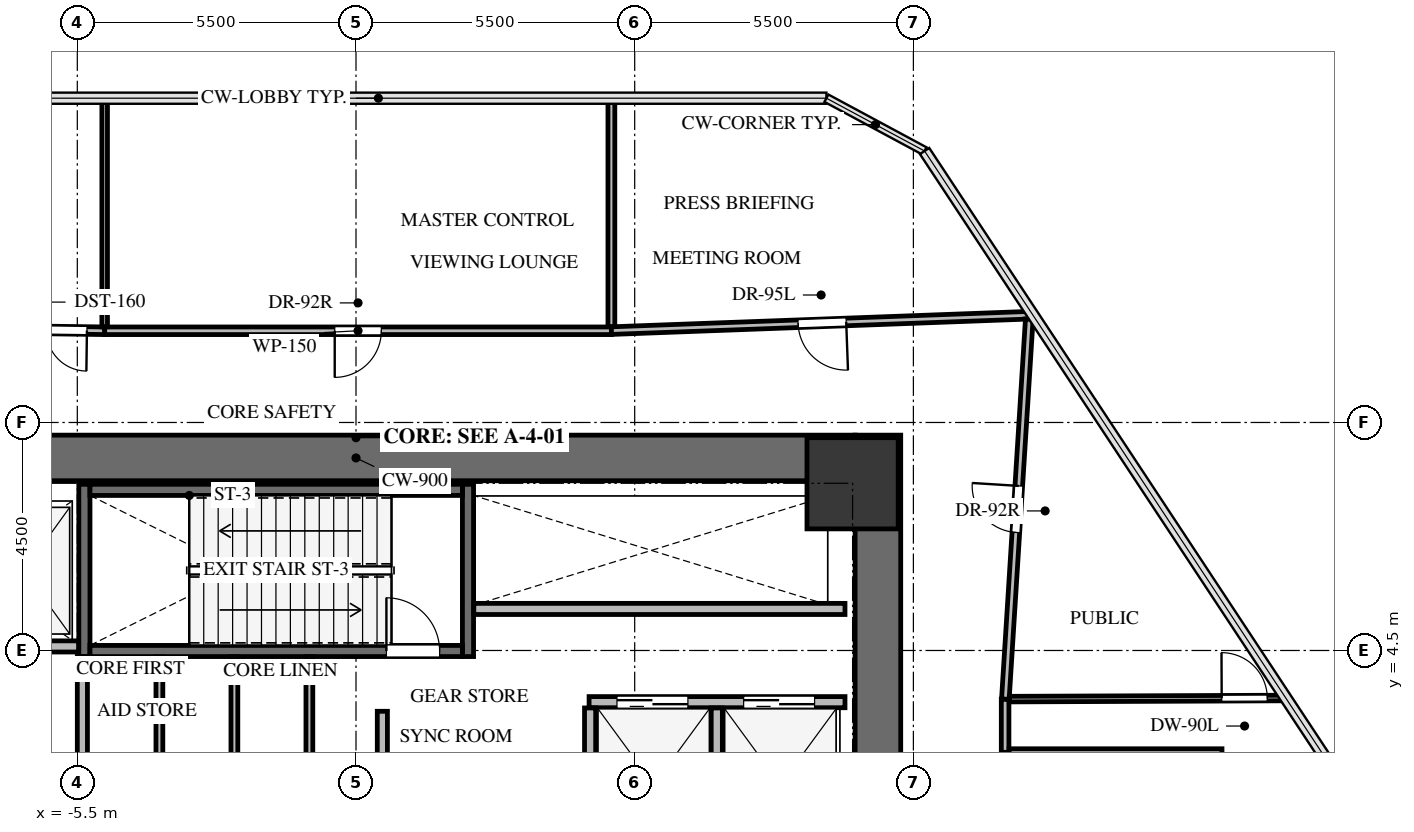
"""IFC4 building model, lengths in metres.
Left out: names, types, materials, properties, quantities, classifications, styles, units other than length and angle.
Written with IfcOpenShell. Run it as: python <this file> out.ifc"""

import sys

from ifc_helpers import new_model, si_unit, direction, frame, frame_2d, origin, origin_2d, place, context, subcontext, project, spatial, rectangle, extrude, source, transform, mapped, element, fill, save


model = new_model("IFC4")
c1 = context("Model", 3, precision=1e-05, world=origin(), true_north=direction((0.0, 1.0)))
c2 = subcontext(c1, "Body", "Model", "MODEL_VIEW")
j1 = project(units=[si_unit("LENGTHUNIT", "METRE"), si_unit("PLANEANGLEUNIT", "RADIAN")], contexts=[c1])
p1 = place(None, origin())
s1 = spatial("IfcSite", under=j1, at=p1, CompositionType="ELEMENT")
p2 = place(p1, origin())
s2 = spatial("IfcBuilding", under=s1, at=p2, CompositionType="ELEMENT")
p3 = place(p2, frame((0.0, 0.0, 5.2)))
s3 = spatial("IfcBuildingStorey", under=s2, at=p3, CompositionType="ELEMENT", Elevation=5.2)
p4 = place(p3, frame((10.3, -8.75, 0.0), z_axis=(0.0, 0.0, 1.0), x_axis=(0.0, 1.0, 0.0)))
e1 = element("IfcWall", 1, at=p4, inside=s3, PredefinedType="SHEAR", context=c2, shape_type="SweptSolid", body=[
    extrude(rectangle(XDim=17.5, YDim=0.9, at=frame_2d((8.75, 0.0))), origin(), (0.0, 0.0, 1.0), 5.2),
])
p5 = place(p3, frame((-9.85, 8.3, 0.0), z_axis=(0.0, 0.0, 1.0), x_axis=(1.0, 0.0, 0.0)))
e2 = element("IfcWall", 2, at=p5, inside=s3, PredefinedType="SHEAR", context=c2, shape_type="SweptSolid", body=[
    extrude(rectangle(XDim=19.7, YDim=0.9, at=frame_2d((9.85, 0.0))), origin(), (0.0, 0.0, 1.0), 5.2),
])
for number, where, z_axis, x_axis in (
    (3, (2.21, 4.38, -0.3), (0.0, 0.0, 1.0), (0.0, 1.0, 0.0)),
    (4, (-5.36, 7.78, -0.3), (0.0, 0.0, 1.0), (0.0, -1.0, 0.0)),
):
    element("IfcWall", number, at=place(p3, frame(where, z_axis=z_axis, x_axis=x_axis)), inside=s3, PredefinedType="SHEAR", context=c2, shape_type="SweptSolid", body=[
        extrude(rectangle(XDim=3.4, YDim=0.22, at=frame_2d((1.7, 0.0))), origin(), (0.0, 0.0, 1.0), 5.15),
    ])
p6 = place(p3, frame((-5.25, 4.49, -0.3), z_axis=(0.0, 0.0, 1.0), x_axis=(1.0, 0.0, 0.0)))
e5 = element("IfcWall", 5, at=p6, inside=s3, PredefinedType="SHEAR", context=c2, shape_type="SweptSolid", body=[
    extrude(rectangle(XDim=7.35, YDim=0.22, at=frame_2d((3.675, 0.0))), origin(), (0.0, 0.0, 1.0), 5.15),
])
p7 = place(p6, frame((5.85, 0.0, 0.0)))
e6 = element("IfcOpeningElement", 6, at=p7, cuts=e5, PredefinedType="OPENING", context=c2, shape_type="SweptSolid", body=[
    extrude(rectangle(XDim=1.05, YDim=2.15, at=frame_2d((0.525, 1.075))), frame((0.0, 0.12, 0.0), z_axis=(0.0, -1.0, 0.0), x_axis=(1.0, 0.0, 0.0)), (0.0, 0.0, 1.0), 0.24),
])
p8 = place(p3, frame((2.1, 7.67, -0.3), z_axis=(0.0, 0.0, 1.0), x_axis=(-1.0, 0.0, 0.0)))
e7 = element("IfcWall", 7, at=p8, inside=s3, PredefinedType="SHEAR", context=c2, shape_type="SweptSolid", body=[
    extrude(rectangle(XDim=7.35, YDim=0.22, at=frame_2d((3.675, 0.0))), origin(), (0.0, 0.0, 1.0), 5.15),
])
m1 = source(origin(), c2, "Body", "SweptSolid", [
    extrude(rectangle(XDim=1.8, YDim=1.8, at=origin_2d()), origin(), (0.0, 0.0, 1.0), 5.15),
])
p9 = place(p3, frame((9.8, 7.8, -0.3), z_axis=(0.0, 0.0, 1.0), x_axis=(1.0, 0.0, 0.0)))
e8 = element("IfcColumn", 8, at=p9, inside=s3, PredefinedType="COLUMN", context=c2, shape_type="MappedRepresentation", body=[
    mapped(m1, transform((0.0, 0.0, 0.0), x_axis=(1.0, 0.0, 0.0), y_axis=(0.0, 1.0, 0.0), z_axis=(0.0, 0.0, 1.0), scale=1.0)),
])
p10 = place(p3, frame((-9.65, 4.58, 0.0), z_axis=(0.0, 0.0, 1.0), x_axis=(1.0, 0.0, 0.0)))
e9 = element("IfcWall", 9, at=p10, inside=s3, PredefinedType="SOLIDWALL", context=c2, shape_type="SweptSolid", body=[
    extrude(rectangle(XDim=4.175, YDim=0.22, at=frame_2d((2.087, 0.0))), origin(), (0.0, 0.0, 1.0), 4.835),
])
p11 = place(p10, frame((0.4, 0.0, 0.0)))
e10 = element("IfcOpeningElement", 10, at=p11, cuts=e9, PredefinedType="OPENING", context=c2, shape_type="SweptSolid", body=[
    extrude(rectangle(XDim=1.2, YDim=2.15, at=frame_2d((0.6, 1.075))), frame((0.0, 0.12, 0.0), z_axis=(0.0, -1.0, 0.0), x_axis=(1.0, 0.0, 0.0)), (0.0, 0.0, 1.0), 0.24),
])
p12 = place(p10, frame((2.4, 0.0, 0.0)))
e11 = element("IfcOpeningElement", 11, at=p12, cuts=e9, PredefinedType="OPENING", context=c2, shape_type="SweptSolid", body=[
    extrude(rectangle(XDim=1.2, YDim=2.15, at=frame_2d((0.6, 1.075))), frame((0.0, 0.12, 0.0), z_axis=(0.0, -1.0, 0.0), x_axis=(1.0, 0.0, 0.0)), (0.0, 0.0, 1.0), 0.24),
])
p13 = place(p3, frame((-5.4, 0.354, 0.0), z_axis=(0.0, 0.0, 1.0), x_axis=(0.0, 1.0, 0.0)))
e12 = element("IfcWall", 12, at=p13, inside=s3, PredefinedType="SOLIDWALL", context=c2, shape_type="SweptSolid", body=[
    extrude(rectangle(XDim=4.026, YDim=0.2, at=frame_2d((2.013, 0.0))), origin(), (0.0, 0.0, 1.0), 4.835),
])
p14 = place(p13, frame((0.246, 0.0, 0.0)))
e13 = element("IfcOpeningElement", 13, at=p14, cuts=e12, PredefinedType="OPENING", context=c2, shape_type="SweptSolid", body=[
    extrude(rectangle(XDim=1.0, YDim=2.15, at=frame_2d((0.5, 1.075))), frame((0.0, 0.11, 0.0), z_axis=(0.0, -1.0, 0.0), x_axis=(1.0, 0.0, 0.0)), (0.0, 0.0, 1.0), 0.22),
])
p15 = place(p3, frame((4.6, 3.48, 0.0), z_axis=(0.0, 0.0, 1.0), x_axis=(1.0, 0.0, 0.0)))
e14 = element("IfcWall", 14, at=p15, inside=s3, PredefinedType="SOLIDWALL", context=c2, shape_type="SweptSolid", body=[
    extrude(rectangle(XDim=5.05, YDim=0.22, at=frame_2d((2.525, 0.0))), origin(), (0.0, 0.0, 1.0), 4.835),
])
p16 = place(p15, frame((0.55, 0.0, 0.0)))
e15 = element("IfcOpeningElement", 15, at=p16, cuts=e14, PredefinedType="OPENING", context=c2, shape_type="SweptSolid", body=[
    extrude(rectangle(XDim=1.4, YDim=2.15, at=frame_2d((0.7, 1.075))), frame((0.0, 0.12, 0.0), z_axis=(0.0, -1.0, 0.0), x_axis=(1.0, 0.0, 0.0)), (0.0, 0.0, 1.0), 0.24),
])
p17 = place(p15, frame((3.05, 0.0, 0.0)))
e16 = element("IfcOpeningElement", 16, at=p17, cuts=e14, PredefinedType="OPENING", context=c2, shape_type="SweptSolid", body=[
    extrude(rectangle(XDim=1.4, YDim=2.15, at=frame_2d((0.7, 1.075))), frame((0.0, 0.12, 0.0), z_axis=(0.0, -1.0, 0.0), x_axis=(1.0, 0.0, 0.0)), (0.0, 0.0, 1.0), 0.24),
])
for number, where, z_axis, x_axis in (
    (17, (4.62, 0.18, 0.0), (0.0, 0.0, 1.0), (0.0, 1.0, 0.0)),
    (18, (7.12, 0.18, 0.0), (0.0, 0.0, 1.0), (0.0, 1.0, 0.0)),
):
    element("IfcWall", number, at=place(p3, frame(where, z_axis=z_axis, x_axis=x_axis)), inside=s3, PredefinedType="SOLIDWALL", context=c2, shape_type="SweptSolid", body=[
        extrude(rectangle(XDim=3.186, YDim=0.22, at=frame_2d((1.593, 0.0))), origin(), (0.0, 0.0, 1.0), 4.835),
    ])
p18 = place(p3, frame((2.325, 5.32, 0.0), z_axis=(0.0, 0.0, 1.0), x_axis=(1.0, 0.0, 0.0)))
e19 = element("IfcWall", 19, at=p18, inside=s3, PredefinedType="SOLIDWALL", context=c2, shape_type="SweptSolid", body=[
    extrude(rectangle(XDim=7.325, YDim=0.22, at=frame_2d((3.663, 0.0))), origin(), (0.0, 0.0, 1.0), 4.835),
])
p19 = place(p3, frame((0.52, 3.3, 0.0), z_axis=(0.0, 0.0, 1.0), x_axis=(0.0, -1.0, 0.0)))
e20 = element("IfcWall", 20, at=p19, inside=s3, PredefinedType="SOLIDWALL", context=c2, shape_type="SweptSolid", body=[
    extrude(rectangle(XDim=1.59, YDim=0.2, at=frame_2d((0.795, 0.0))), origin(), (0.0, 0.0, 1.0), 4.835),
])
p20 = place(p3, frame((-4.96, 10.81, 0.0), z_axis=(0.0, 0.0, 1.0), x_axis=(-0.999906232337, 0.01369403281, 0.0)))
e21 = element("IfcWall", 21, at=p20, inside=s3, PredefinedType="PARTITIONING", context=c2, shape_type="SweptSolid", body=[
    extrude(rectangle(XDim=8.076, YDim=0.15, at=frame_2d((4.038, 0.0))), origin(), (0.0, 0.0, 1.0), 3.757),
])
p21 = place(p20, frame((0.35, 0.0, 0.0)))
e22 = element("IfcOpeningElement", 22, at=p21, cuts=e21, PredefinedType="OPENING", context=c2, shape_type="SweptSolid", body=[
    extrude(rectangle(XDim=1.6, YDim=2.15, at=frame_2d((0.8, 1.075))), frame((0.0, 0.085, 0.0), z_axis=(0.0, -1.0, 0.0), x_axis=(1.0, 0.0, 0.0)), (0.0, 0.0, 1.0), 0.17),
])
p22 = place(p3, frame((5.04, 10.81, 0.0), z_axis=(0.0, 0.0, 1.0), x_axis=(-1.0, 0.0, 0.0)))
e23 = element("IfcWall", 23, at=p22, inside=s3, PredefinedType="PARTITIONING", context=c2, shape_type="SweptSolid", body=[
    extrude(rectangle(XDim=10.0, YDim=0.15, at=frame_2d((5.0, 0.0))), origin(), (0.0, 0.0, 1.0), 4.835),
])
p23 = place(p22, frame((4.54, 0.0, 0.0)))
e24 = element("IfcOpeningElement", 24, at=p23, cuts=e23, PredefinedType="OPENING", context=c2, shape_type="SweptSolid", body=[
    extrude(rectangle(XDim=0.92, YDim=2.1, at=frame_2d((0.46, 1.05))), frame((0.0, 0.085, 0.0), z_axis=(0.0, -1.0, 0.0), x_axis=(1.0, 0.0, 0.0)), (0.0, 0.0, 1.0), 0.17),
])
p24 = place(p3, frame((13.359, 11.12, 0.0), z_axis=(0.0, 0.0, 1.0), x_axis=(-0.999321326716, -0.036835933156, 0.0)))
e25 = element("IfcWall", 25, at=p24, inside=s3, PredefinedType="PARTITIONING", context=c2, shape_type="SweptSolid", body=[
    extrude(rectangle(XDim=8.324, YDim=0.15, at=frame_2d((4.162, 0.0))), origin(), (0.0, 0.0, 1.0), 3.757),
])
p25 = place(p24, frame((3.687, 0.0, 0.0)))
e26 = element("IfcOpeningElement", 26, at=p25, cuts=e25, PredefinedType="OPENING", context=c2, shape_type="SweptSolid", body=[
    extrude(rectangle(XDim=0.95, YDim=2.1, at=frame_2d((0.475, 1.05))), frame((0.0, 0.085, 0.0), z_axis=(0.0, -1.0, 0.0), x_axis=(1.0, 0.0, 0.0)), (0.0, 0.0, 1.0), 0.17),
])
p26 = place(p3, frame((12.81, 2.49, 0.0), z_axis=(0.0, 0.0, 1.0), x_axis=(0.0, 1.0, 0.0)))
e27 = element("IfcWall", 27, at=p26, inside=s3, PredefinedType="PARTITIONING", context=c2, shape_type="SweptSolid", body=[
    extrude(rectangle(XDim=1.05, YDim=0.15, at=frame_2d((0.525, 0.0))), origin(), (0.0, 0.0, 1.0), 4.835),
])
p27 = place(p3, frame((12.815, 3.54, 0.0), z_axis=(0.0, 0.0, 1.0), x_axis=(0.062817309995, 0.998025042554, 0.0)))
e28 = element("IfcWall", 28, at=p27, inside=s3, PredefinedType="PARTITIONING", context=c2, shape_type="SweptSolid", body=[
    extrude(rectangle(XDim=7.513, YDim=0.15, at=frame_2d((3.756, 0.0))), origin(), (0.0, 0.0, 1.0), 4.835),
])
p28 = place(p27, frame((3.296, 0.0, 0.0)))
e29 = element("IfcOpeningElement", 29, at=p28, cuts=e28, PredefinedType="OPENING", context=c2, shape_type="SweptSolid", body=[
    extrude(rectangle(XDim=0.92, YDim=2.1, at=frame_2d((0.46, 1.05))), frame((0.0, 0.085, 0.0), z_axis=(0.0, -1.0, 0.0), x_axis=(1.0, 0.0, 0.0)), (0.0, 0.0, 1.0), 0.17),
])
for number, where, z_axis, x_axis in (
    (30, (-3.88, 4.375, 0.0), (0.0, 0.0, 1.0), (0.0, -1.0, 0.0)),
    (31, (-2.4, 4.375, 0.0), (0.0, 0.0, 1.0), (0.0, -1.0, 0.0)),
):
    element("IfcWall", number, at=place(p3, frame(where, z_axis=z_axis, x_axis=x_axis)), inside=s3, PredefinedType="PARTITIONING", context=c2, shape_type="SweptSolid", body=[
        extrude(rectangle(XDim=2.586, YDim=0.135, at=frame_2d((1.293, 0.0))), origin(), (0.0, 0.0, 1.0), 4.835),
    ])
p29 = place(p3, frame((-0.92, 4.375, 0.0), z_axis=(0.0, 0.0, 1.0), x_axis=(0.0, -1.0, 0.0)))
e32 = element("IfcWall", 32, at=p29, inside=s3, PredefinedType="PARTITIONING", context=c2, shape_type="SweptSolid", body=[
    extrude(rectangle(XDim=2.561, YDim=0.135, at=frame_2d((1.281, 0.0))), origin(), (0.0, 0.0, 1.0), 4.835),
])
p30 = place(p3, frame((12.889, 2.49, 0.0), z_axis=(0.0, 0.0, 1.0), x_axis=(1.0, 0.0, 0.0)))
e33 = element("IfcWall", 33, at=p30, inside=s3, PredefinedType="PARTITIONING", context=c2, shape_type="SweptSolid", body=[
    extrude(rectangle(XDim=4.201, YDim=0.14, at=frame_2d((2.101, 0.0))), origin(), (0.0, 0.0, 1.0), 4.835),
])
p31 = place(p3, frame((-4.96, 15.4, 0.0), z_axis=(0.0, 0.0, 1.0), x_axis=(0.0, -1.0, 0.0)))
e34 = element("IfcWall", 34, at=p31, inside=s3, PredefinedType="MOVABLE", context=c2, shape_type="SweptSolid", body=[
    extrude(rectangle(XDim=4.511, YDim=0.11, at=frame_2d((2.255, 0.0))), origin(), (0.0, 0.0, 1.0), 4.835),
])
p32 = place(p3, frame((5.04, 15.4, 0.0), z_axis=(0.0, 0.0, 1.0), x_axis=(0.0, -1.0, 0.0)))
e35 = element("IfcWall", 35, at=p32, inside=s3, PredefinedType="PARTITIONING", context=c2, shape_type="SweptSolid", body=[
    extrude(rectangle(XDim=4.508, YDim=0.135, at=frame_2d((2.254, 0.0))), origin(), (0.0, 0.0, 1.0), 4.835),
])
p33 = place(p3, frame((13.549, 10.832, 0.0), z_axis=(0.0, 0.0, 1.0), x_axis=(-0.551098760487, 0.83444002552, 0.0)))
e36 = element("IfcWall", 36, at=p33, inside=s3, PredefinedType="MOVABLE", context=c2, shape_type="SweptSolid", body=[
    extrude(rectangle(XDim=0.345, YDim=0.11, at=frame_2d((0.172, 0.0))), origin(), (0.0, 0.0, 1.0), 4.835),
])
p34 = place(p3, frame((12.894, 3.54, 0.0), z_axis=(0.0, 0.0, 1.0), x_axis=(0.999992066554, 0.003983318888, 0.0)))
e37 = element("IfcWall", 37, at=p34, inside=s3, PredefinedType="MOVABLE", context=c2, shape_type="SweptSolid", body=[
    extrude(rectangle(XDim=5.455, YDim=0.11, at=frame_2d((2.728, 0.0))), origin(), (0.0, 0.0, 1.0), 4.835),
])
p35 = place(p34, frame((4.19, 0.0, 0.0)))
e38 = element("IfcOpeningElement", 38, at=p35, cuts=e37, PredefinedType="OPENING", context=c2, shape_type="SweptSolid", body=[
    extrude(rectangle(XDim=0.9, YDim=2.05, at=frame_2d((0.45, 1.025))), frame((0.0, 0.065, 0.0), z_axis=(0.0, -1.0, 0.0), x_axis=(1.0, 0.0, 0.0)), (0.0, 0.0, 1.0), 0.13),
])
m2 = source(origin(), c2, "Body", "SweptSolid", [
    extrude(rectangle(XDim=1.05, YDim=2.15, at=frame_2d((0.525, 1.075))), frame((0.0, 0.025, 0.0), z_axis=(0.0, -1.0, 0.0), x_axis=(1.0, 0.0, 0.0)), (0.0, 0.0, 1.0), 0.05),
])
p36 = place(p7, origin())
e39 = element("IfcDoor", 39, at=p36, inside=s3, OperationType="SINGLE_SWING_LEFT", PredefinedType="DOOR", context=c2, shape_type="MappedRepresentation", body=[
    mapped(m2, transform((0.0, 0.0, 0.0), x_axis=(1.0, 0.0, 0.0), y_axis=(0.0, 1.0, 0.0), z_axis=(0.0, 0.0, 1.0), scale=1.0)),
])
fill(e6, e39)
m3 = source(origin(), c2, "Body", "SweptSolid", [
    extrude(rectangle(XDim=1.4, YDim=2.15, at=frame_2d((0.7, 1.075))), frame((0.0, 0.025, 0.0), z_axis=(0.0, -1.0, 0.0), x_axis=(1.0, 0.0, 0.0)), (0.0, 0.0, 1.0), 0.05),
])
p37 = place(p16, origin())
e40 = element("IfcDoor", 40, at=p37, inside=s3, OperationType="DOUBLE_DOOR_SLIDING", PredefinedType="DOOR", context=c2, shape_type="MappedRepresentation", body=[
    mapped(m3, transform((0.0, 0.0, 0.0), x_axis=(1.0, 0.0, 0.0), y_axis=(0.0, 1.0, 0.0), z_axis=(0.0, 0.0, 1.0), scale=1.0)),
])
fill(e15, e40)
p38 = place(p17, origin())
e41 = element("IfcDoor", 41, at=p38, inside=s3, OperationType="DOUBLE_DOOR_SLIDING", PredefinedType="DOOR", context=c2, shape_type="MappedRepresentation", body=[
    mapped(m3, transform((0.0, 0.0, 0.0), x_axis=(1.0, 0.0, 0.0), y_axis=(0.0, 1.0, 0.0), z_axis=(0.0, 0.0, 1.0), scale=1.0)),
])
fill(e16, e41)
m4 = source(origin(), c2, "Body", "SweptSolid", [
    extrude(rectangle(XDim=1.6, YDim=2.15, at=frame_2d((0.8, 1.075))), frame((0.0, 0.025, 0.0), z_axis=(0.0, -1.0, 0.0), x_axis=(1.0, 0.0, 0.0)), (0.0, 0.0, 1.0), 0.05),
])
p39 = place(p21, origin())
e42 = element("IfcDoor", 42, at=p39, inside=s3, OperationType="DOUBLE_DOOR_SINGLE_SWING", PredefinedType="DOOR", context=c2, shape_type="MappedRepresentation", body=[
    mapped(m4, transform((0.0, 0.0, 0.0), x_axis=(1.0, 0.0, 0.0), y_axis=(0.0, 1.0, 0.0), z_axis=(0.0, 0.0, 1.0), scale=1.0)),
])
fill(e22, e42)
m5 = source(origin(), c2, "Body", "SweptSolid", [
    extrude(rectangle(XDim=0.92, YDim=2.1, at=frame_2d((0.46, 1.05))), frame((0.0, 0.025, 0.0), z_axis=(0.0, -1.0, 0.0), x_axis=(1.0, 0.0, 0.0)), (0.0, 0.0, 1.0), 0.05),
])
p40 = place(p23, origin())
e43 = element("IfcDoor", 43, at=p40, inside=s3, OperationType="SINGLE_SWING_RIGHT", PredefinedType="DOOR", context=c2, shape_type="MappedRepresentation", body=[
    mapped(m5, transform((0.0, 0.0, 0.0), x_axis=(1.0, 0.0, 0.0), y_axis=(0.0, 1.0, 0.0), z_axis=(0.0, 0.0, 1.0), scale=1.0)),
])
fill(e24, e43)
m6 = source(origin(), c2, "Body", "SweptSolid", [
    extrude(rectangle(XDim=0.95, YDim=2.1, at=frame_2d((0.475, 1.05))), frame((0.0, 0.025, 0.0), z_axis=(0.0, -1.0, 0.0), x_axis=(1.0, 0.0, 0.0)), (0.0, 0.0, 1.0), 0.05),
])
p41 = place(p25, origin())
e44 = element("IfcDoor", 44, at=p41, inside=s3, OperationType="SINGLE_SWING_LEFT", PredefinedType="DOOR", context=c2, shape_type="MappedRepresentation", body=[
    mapped(m6, transform((0.0, 0.0, 0.0), x_axis=(1.0, 0.0, 0.0), y_axis=(0.0, 1.0, 0.0), z_axis=(0.0, 0.0, 1.0), scale=1.0)),
])
fill(e26, e44)
p42 = place(p28, origin())
e45 = element("IfcDoor", 45, at=p42, inside=s3, OperationType="SINGLE_SWING_RIGHT", PredefinedType="DOOR", context=c2, shape_type="MappedRepresentation", body=[
    mapped(m5, transform((0.0, 0.0, 0.0), x_axis=(1.0, 0.0, 0.0), y_axis=(0.0, 1.0, 0.0), z_axis=(0.0, 0.0, 1.0), scale=1.0)),
])
fill(e29, e45)
m7 = source(origin(), c2, "Body", "SweptSolid", [
    extrude(rectangle(XDim=0.9, YDim=2.05, at=frame_2d((0.45, 1.025))), frame((0.0, 0.025, 0.0), z_axis=(0.0, -1.0, 0.0), x_axis=(1.0, 0.0, 0.0)), (0.0, 0.0, 1.0), 0.05),
])
p43 = place(p35, origin())
e46 = element("IfcDoor", 46, at=p43, inside=s3, OperationType="SINGLE_SWING_LEFT", PredefinedType="DOOR", context=c2, shape_type="MappedRepresentation", body=[
    mapped(m7, transform((0.0, 0.0, 0.0), x_axis=(1.0, 0.0, 0.0), y_axis=(0.0, 1.0, 0.0), z_axis=(0.0, 0.0, 1.0), scale=1.0)),
])
fill(e38, e46)
save(model, sys.argv[1])
